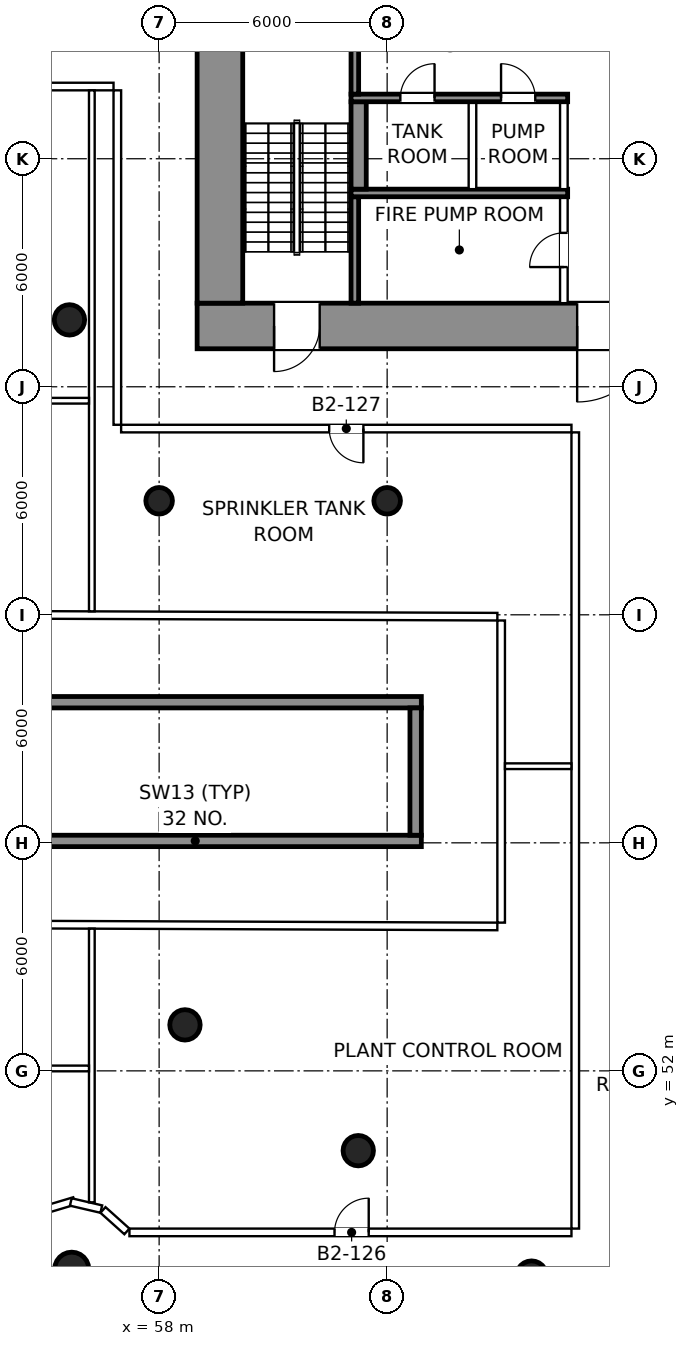
"""IFC4 building model, lengths in metres.
Left out: names, types, materials, properties, quantities, classifications, styles, units other than length and angle.
Written with IfcOpenShell. Run it as: python <this file> out.ifc"""

import sys

from ifc_helpers import new_model, si_unit, direction, frame, frame_2d, origin, origin_2d, place, context, subcontext, project, spatial, rectangle, circle, extrude, element, fill, save


model = new_model("IFC4")
c1 = context("Model", 3, precision=1e-05, world=origin(), true_north=direction((0.0, 1.0)))
c2 = subcontext(c1, "Body", "Model", "MODEL_VIEW")
j1 = project(units=[si_unit("LENGTHUNIT", "METRE"), si_unit("PLANEANGLEUNIT", "RADIAN")], contexts=[c1])
p1 = place(None, origin())
s1 = spatial("IfcSite", under=j1, at=p1, CompositionType="ELEMENT")
p2 = place(p1, origin())
s2 = spatial("IfcBuilding", under=s1, at=p2, CompositionType="ELEMENT")
p3 = place(p2, frame((0.0, 0.0, -10.0)))
s3 = spatial("IfcBuildingStorey", under=s2, at=p3, CompositionType="ELEMENT", Elevation=-10.0)
p4 = place(p3, frame((55.7, 46.78, 0.0), z_axis=(0.0, 0.0, 1.0), x_axis=(1.0, 0.0, 0.0)))
e1 = element("IfcColumn", 1, at=p4, inside=s3, PredefinedType="COLUMN", context=c2, shape_type="SweptSolid", body=[
    extrude(circle(Radius=0.45, at=origin_2d()), origin(), (0.0, 0.0, 1.0), 5.0),
])
for number, where, z_axis, x_axis in (
    (2, (58.68, 53.21, 0.0), (0.0, 0.0, 1.0), (1.0, 0.0, 0.0)),
    (3, (63.24, 49.9, 0.0), (0.0, 0.0, 1.0), (1.0, 0.0, 0.0)),
    (4, (67.8, 46.6, 0.0), (0.0, 0.0, 1.0), (1.0, 0.0, 0.0)),
    (5, (55.64, 71.76, 0.0), (0.0, 0.0, 1.0), (1.0, 0.0, 0.0)),
):
    element("IfcColumn", number, at=place(p3, frame(where, z_axis=z_axis, x_axis=x_axis)), inside=s3, PredefinedType="COLUMN", context=c2, shape_type="SweptSolid", body=[
        extrude(circle(Radius=0.4, at=origin_2d()), origin(), (0.0, 0.0, 1.0), 5.0),
    ])
for number, where, z_axis, x_axis in (
    (6, (58.0, 67.0, 0.0), (0.0, 0.0, 1.0), (1.0, 0.0, 0.0)),
    (7, (64.0, 67.0, 0.0), (0.0, 0.0, 1.0), (1.0, 0.0, 0.0)),
):
    element("IfcColumn", number, at=place(p3, frame(where, z_axis=z_axis, x_axis=x_axis)), inside=s3, PredefinedType="COLUMN", context=c2, shape_type="SweptSolid", body=[
        extrude(circle(Radius=0.35, at=origin_2d()), origin(), (0.0, 0.0, 1.0), 5.0),
    ])
p5 = place(p3, frame((59.0, 71.6, 0.0), z_axis=(0.0, 0.0, 1.0), x_axis=(1.0, 0.0, 0.0)))
e8 = element("IfcWall", 8, at=p5, inside=s3, PredefinedType="SHEAR", context=c2, shape_type="SweptSolid", body=[
    extrude(rectangle(XDim=22.0, YDim=1.2, at=frame_2d((11.0, 0.0))), origin(), (0.0, 0.0, 1.0), 5.0),
])
p6 = place(p5, frame((2.025, 0.0, 0.0)))
e9 = element("IfcOpeningElement", 9, at=p6, cuts=e8, PredefinedType="OPENING", context=c2, shape_type="SweptSolid", body=[
    extrude(rectangle(XDim=1.2, YDim=2.1, at=frame_2d((0.6, 1.05))), frame((0.0, 0.61, 0.0), z_axis=(0.0, -1.0, 0.0), x_axis=(1.0, 0.0, 0.0)), (0.0, 0.0, 1.0), 1.22),
])
p7 = place(p5, frame((18.775, 0.0, 0.0)))
e10 = element("IfcOpeningElement", 10, at=p7, cuts=e8, PredefinedType="OPENING", context=c2, shape_type="SweptSolid", body=[
    extrude(rectangle(XDim=1.2, YDim=2.1, at=frame_2d((0.6, 1.05))), frame((0.0, 0.61, 0.0), z_axis=(0.0, -1.0, 0.0), x_axis=(1.0, 0.0, 0.0)), (0.0, 0.0, 1.0), 1.22),
])
p8 = place(p5, frame((10.0, 0.0, 0.0)))
e11 = element("IfcOpeningElement", 11, at=p8, cuts=e8, PredefinedType="OPENING", context=c2, shape_type="SweptSolid", body=[
    extrude(rectangle(XDim=2.0, YDim=2.1, at=frame_2d((1.0, 1.05))), frame((0.0, 0.61, 0.0), z_axis=(0.0, -1.0, 0.0), x_axis=(1.0, 0.0, 0.0)), (0.0, 0.0, 1.0), 1.22),
])
p9 = place(p3, frame((59.6, 72.2, 0.0), z_axis=(0.0, 0.0, 1.0), x_axis=(0.0, 1.0, 0.0)))
e12 = element("IfcWall", 12, at=p9, inside=s3, PredefinedType="SHEAR", context=c2, shape_type="SweptSolid", body=[
    extrude(rectangle(XDim=8.7, YDim=1.2, at=frame_2d((4.35, 0.0))), origin(), (0.0, 0.0, 1.0), 5.0),
])
p10 = place(p3, frame((63.15, 72.2, 0.0), z_axis=(0.0, 0.0, 1.0), x_axis=(0.0, 1.0, 0.0)))
e13 = element("IfcWall", 13, at=p10, inside=s3, PredefinedType="SHEAR", context=c2, shape_type="SweptSolid", body=[
    extrude(rectangle(XDim=2.8, YDim=0.2, at=frame_2d((1.4, 0.0))), origin(), (0.0, 0.0, 1.0), 5.0),
])
p11 = place(p3, frame((68.65, 72.2, 0.0), z_axis=(0.0, 0.0, 1.0), x_axis=(0.0, 1.0, 0.0)))
e14 = element("IfcWall", 14, at=p11, inside=s3, PredefinedType="PARTITIONING", context=c2, shape_type="SweptSolid", body=[
    extrude(rectangle(XDim=2.8, YDim=0.2, at=frame_2d((1.4, 0.0))), origin(), (0.0, 0.0, 1.0), 4.65),
])
p12 = place(p11, frame((0.95, 0.0, 0.0)))
e15 = element("IfcOpeningElement", 15, at=p12, cuts=e14, PredefinedType="OPENING", context=c2, shape_type="SweptSolid", body=[
    extrude(rectangle(XDim=0.9, YDim=2.1, at=frame_2d((0.45, 1.05))), frame((0.0, 0.11, 0.0), z_axis=(0.0, -1.0, 0.0), x_axis=(1.0, 0.0, 0.0)), (0.0, 0.0, 1.0), 0.22),
])
p13 = place(p3, frame((63.05, 75.1, 0.0), z_axis=(0.0, 0.0, 1.0), x_axis=(1.0, 0.0, 0.0)))
e16 = element("IfcWall", 16, at=p13, inside=s3, PredefinedType="SHEAR", context=c2, shape_type="SweptSolid", body=[
    extrude(rectangle(XDim=5.7, YDim=0.2, at=frame_2d((2.85, 0.0))), origin(), (0.0, 0.0, 1.0), 5.0),
])
p14 = place(p3, frame((63.25, 75.2, 0.0), z_axis=(0.0, 0.0, 1.0), x_axis=(0.0, 1.0, 0.0)))
e17 = element("IfcWall", 17, at=p14, inside=s3, PredefinedType="SHEAR", context=c2, shape_type="SweptSolid", body=[
    extrude(rectangle(XDim=2.3, YDim=0.4, at=frame_2d((1.15, 0.0))), origin(), (0.0, 0.0, 1.0), 5.0),
])
for number, where, z_axis, x_axis in (
    (18, (66.245, 75.2, 0.0), (0.0, 0.0, 1.0), (0.0, 1.0, 0.0)),
    (19, (68.65, 75.2, 0.0), (0.0, 0.0, 1.0), (0.0, 1.0, 0.0)),
):
    element("IfcWall", number, at=place(p3, frame(where, z_axis=z_axis, x_axis=x_axis)), inside=s3, PredefinedType="PARTITIONING", context=c2, shape_type="SweptSolid", body=[
        extrude(rectangle(XDim=2.3, YDim=0.2, at=frame_2d((1.15, 0.0))), origin(), (0.0, 0.0, 1.0), 4.65),
    ])
p15 = place(p3, frame((63.05, 77.6, 0.0), z_axis=(0.0, 0.0, 1.0), x_axis=(1.0, 0.0, 0.0)))
e20 = element("IfcWall", 20, at=p15, inside=s3, PredefinedType="SHEAR", context=c2, shape_type="SweptSolid", body=[
    extrude(rectangle(XDim=5.7, YDim=0.2, at=frame_2d((2.85, 0.0))), origin(), (0.0, 0.0, 1.0), 5.0),
])
p16 = place(p15, frame((1.298, 0.0, 0.0)))
e21 = element("IfcOpeningElement", 21, at=p16, cuts=e20, PredefinedType="OPENING", context=c2, shape_type="SweptSolid", body=[
    extrude(rectangle(XDim=0.9, YDim=2.1, at=frame_2d((0.45, 1.05))), frame((0.0, 0.11, 0.0), z_axis=(0.0, -1.0, 0.0), x_axis=(1.0, 0.0, 0.0)), (0.0, 0.0, 1.0), 0.22),
])
p17 = place(p15, frame((3.948, 0.0, 0.0)))
e22 = element("IfcOpeningElement", 22, at=p17, cuts=e20, PredefinedType="OPENING", context=c2, shape_type="SweptSolid", body=[
    extrude(rectangle(XDim=0.9, YDim=2.1, at=frame_2d((0.45, 1.05))), frame((0.0, 0.11, 0.0), z_axis=(0.0, -1.0, 0.0), x_axis=(1.0, 0.0, 0.0)), (0.0, 0.0, 1.0), 0.22),
])
p18 = place(p3, frame((63.15, 77.7, 0.0), z_axis=(0.0, 0.0, 1.0), x_axis=(0.0, 1.0, 0.0)))
e23 = element("IfcWall", 23, at=p18, inside=s3, PredefinedType="SHEAR", context=c2, shape_type="SweptSolid", body=[
    extrude(rectangle(XDim=3.2, YDim=0.2, at=frame_2d((1.6, 0.0))), origin(), (0.0, 0.0, 1.0), 5.0),
])
for number, where, z_axis, x_axis in (
    (24, (53.0, 58.05, 0.0), (0.0, 0.0, 1.0), (1.0, 0.0, 0.0)),
    (25, (53.0, 61.7, 0.0), (0.0, 0.0, 1.0), (1.0, 0.0, 0.0)),
):
    element("IfcWall", number, at=place(p3, frame(where, z_axis=z_axis, x_axis=x_axis)), inside=s3, PredefinedType="SHEAR", context=c2, shape_type="SweptSolid", body=[
        extrude(rectangle(XDim=11.9, YDim=0.3, at=frame_2d((5.95, 0.0))), origin(), (0.0, 0.0, 1.0), 5.0),
    ])
p19 = place(p3, frame((64.75, 58.2, 0.0), z_axis=(0.0, 0.0, 1.0), x_axis=(0.0, 1.0, 0.0)))
e26 = element("IfcWall", 26, at=p19, inside=s3, PredefinedType="SHEAR", context=c2, shape_type="SweptSolid", body=[
    extrude(rectangle(XDim=3.35, YDim=0.3, at=frame_2d((1.675, 0.0))), origin(), (0.0, 0.0, 1.0), 5.0),
])
p20 = place(p3, frame((63.17, 31.88, 0.0), z_axis=(0.0, 0.0, 1.0), x_axis=(-0.809016646189, 0.587785731529, 0.0)))
e27 = element("IfcWall", 27, at=p20, inside=s3, PredefinedType="PARTITIONING", context=c2, shape_type="SweptSolid", body=[
    extrude(rectangle(XDim=26.708, YDim=0.2, at=frame_2d((13.354, 0.0))), origin(), (0.0, 0.0, 1.0), 4.65),
])
p21 = place(p20, frame((24.097, 0.0, 0.0)))
e28 = element("IfcOpeningElement", 28, at=p21, cuts=e27, PredefinedType="OPENING", context=c2, shape_type="SweptSolid", body=[
    extrude(rectangle(XDim=0.9, YDim=2.1, at=frame_2d((0.45, 1.05))), frame((0.0, 0.11, 0.0), z_axis=(0.0, -1.0, 0.0), x_axis=(1.0, 0.0, 0.0)), (0.0, 0.0, 1.0), 0.22),
])
p22 = place(p20, frame((15.904, 0.0, 0.0)))
e29 = element("IfcOpeningElement", 29, at=p22, cuts=e27, PredefinedType="OPENING", context=c2, shape_type="SweptSolid", body=[
    extrude(rectangle(XDim=0.9, YDim=2.1, at=frame_2d((0.45, 1.05))), frame((0.0, 0.11, 0.0), z_axis=(0.0, -1.0, 0.0), x_axis=(1.0, 0.0, 0.0)), (0.0, 0.0, 1.0), 0.22),
])
p23 = place(p20, frame((4.711, 0.0, 0.0)))
e30 = element("IfcOpeningElement", 30, at=p23, cuts=e27, PredefinedType="OPENING", context=c2, shape_type="SweptSolid", body=[
    extrude(rectangle(XDim=0.9, YDim=2.1, at=frame_2d((0.45, 1.05))), frame((0.0, 0.11, 0.0), z_axis=(0.0, -1.0, 0.0), x_axis=(1.0, 0.0, 0.0)), (0.0, 0.0, 1.0), 0.22),
])
p24 = place(p3, frame((67.0, 63.85, 0.0), z_axis=(0.0, 0.0, 1.0), x_axis=(0.0, -1.0, 0.0)))
e31 = element("IfcWall", 31, at=p24, inside=s3, PredefinedType="PARTITIONING", context=c2, shape_type="SweptSolid", body=[
    extrude(rectangle(XDim=7.95, YDim=0.2, at=frame_2d((3.975, 0.0))), origin(), (0.0, 0.0, 1.0), 4.65),
])
p25 = place(p3, frame((66.9, 55.8, 0.0), z_axis=(0.0, 0.0, 1.0), x_axis=(-0.999992570732, 0.003854670107, 0.0)))
e32 = element("IfcWall", 32, at=p25, inside=s3, PredefinedType="PARTITIONING", context=c2, shape_type="SweptSolid", body=[
    extrude(rectangle(XDim=25.715, YDim=0.2, at=frame_2d((12.857, 0.0))), origin(), (0.0, 0.0, 1.0), 3.85),
])
p26 = place(p25, frame((21.251, 0.0, 0.0)))
e33 = element("IfcOpeningElement", 33, at=p26, cuts=e32, PredefinedType="OPENING", context=c2, shape_type="SweptSolid", body=[
    extrude(rectangle(XDim=0.9, YDim=2.1, at=frame_2d((0.45, 1.05))), frame((0.0, 0.11, 0.0), z_axis=(0.0, -1.0, 0.0), x_axis=(1.0, 0.0, 0.0)), (0.0, 0.0, 1.0), 0.22),
])
p27 = place(p3, frame((52.885, 47.716, 0.0), z_axis=(0.0, 0.0, 1.0), x_axis=(0.958064878425, 0.286551371885, 0.0)))
e34 = element("IfcWall", 34, at=p27, inside=s3, PredefinedType="PARTITIONING", context=c2, shape_type="SweptSolid", body=[
    extrude(rectangle(XDim=3.009, YDim=0.2, at=frame_2d((1.505, 0.0))), origin(), (0.0, 0.0, 1.0), 3.95),
])
p28 = place(p3, frame((55.676, 48.55, 0.0), z_axis=(0.0, 0.0, 1.0), x_axis=(0.973904551026, -0.226957981772, 0.0)))
e35 = element("IfcWall", 35, at=p28, inside=s3, PredefinedType="PARTITIONING", context=c2, shape_type="SweptSolid", body=[
    extrude(rectangle(XDim=0.824, YDim=0.2, at=frame_2d((0.412, 0.0))), origin(), (0.0, 0.0, 1.0), 4.65),
])
p29 = place(p3, frame((56.522, 48.34, 0.0), z_axis=(0.0, 0.0, 1.0), x_axis=(0.744440847373, -0.667688418923, 0.0)))
e36 = element("IfcWall", 36, at=p29, inside=s3, PredefinedType="PARTITIONING", context=c2, shape_type="SweptSolid", body=[
    extrude(rectangle(XDim=0.846, YDim=0.2, at=frame_2d((0.423, 0.0))), origin(), (0.0, 0.0, 1.0), 4.65),
])
p30 = place(p3, frame((57.219, 47.75, 0.0), z_axis=(0.0, 0.0, 1.0), x_axis=(1.0, 0.0, 0.0)))
e37 = element("IfcWall", 37, at=p30, inside=s3, PredefinedType="PARTITIONING", context=c2, shape_type="SweptSolid", body=[
    extrude(rectangle(XDim=11.631, YDim=0.2, at=frame_2d((5.815, 0.0))), origin(), (0.0, 0.0, 1.0), 3.85),
])
p31 = place(p30, frame((5.396, 0.0, 0.0)))
e38 = element("IfcOpeningElement", 38, at=p31, cuts=e37, PredefinedType="OPENING", context=c2, shape_type="SweptSolid", body=[
    extrude(rectangle(XDim=0.9, YDim=2.1, at=frame_2d((0.45, 1.05))), frame((0.0, 0.11, 0.0), z_axis=(0.0, -1.0, 0.0), x_axis=(1.0, 0.0, 0.0)), (0.0, 0.0, 1.0), 0.22),
])
p32 = place(p3, frame((68.95, 47.85, 0.0), z_axis=(0.0, 0.0, 1.0), x_axis=(0.0, 1.0, 0.0)))
e39 = element("IfcWall", 39, at=p32, inside=s3, PredefinedType="PARTITIONING", context=c2, shape_type="SweptSolid", body=[
    extrude(rectangle(XDim=20.95, YDim=0.2, at=frame_2d((10.475, 0.0))), origin(), (0.0, 0.0, 1.0), 4.65),
])
p33 = place(p3, frame((68.85, 68.9, 0.0), z_axis=(0.0, 0.0, 1.0), x_axis=(-1.0, 0.0, 0.0)))
e40 = element("IfcWall", 40, at=p33, inside=s3, PredefinedType="PARTITIONING", context=c2, shape_type="SweptSolid", body=[
    extrude(rectangle(XDim=11.85, YDim=0.2, at=frame_2d((5.925, 0.0))), origin(), (0.0, 0.0, 1.0), 4.65),
])
p34 = place(p33, frame((5.475, 0.0, 0.0)))
e41 = element("IfcOpeningElement", 41, at=p34, cuts=e40, PredefinedType="OPENING", context=c2, shape_type="SweptSolid", body=[
    extrude(rectangle(XDim=0.9, YDim=2.1, at=frame_2d((0.45, 1.05))), frame((0.0, 0.11, 0.0), z_axis=(0.0, -1.0, 0.0), x_axis=(1.0, 0.0, 0.0)), (0.0, 0.0, 1.0), 0.22),
])
p35 = place(p3, frame((56.9, 69.0, 0.0), z_axis=(0.0, 0.0, 1.0), x_axis=(0.0, 1.0, 0.0)))
e42 = element("IfcWall", 42, at=p35, inside=s3, PredefinedType="PARTITIONING", context=c2, shape_type="SweptSolid", body=[
    extrude(rectangle(XDim=8.8, YDim=0.2, at=frame_2d((4.4, 0.0))), origin(), (0.0, 0.0, 1.0), 3.85),
])
p36 = place(p3, frame((56.8, 77.9, 0.0), z_axis=(0.0, 0.0, 1.0), x_axis=(-1.0, 0.0, 0.0)))
e43 = element("IfcWall", 43, at=p36, inside=s3, PredefinedType="PARTITIONING", context=c2, shape_type="SweptSolid", body=[
    extrude(rectangle(XDim=11.547, YDim=0.2, at=frame_2d((5.773, 0.0))), origin(), (0.0, 0.0, 1.0), 4.65),
])
p37 = place(p36, frame((4.67, 0.0, 0.0)))
e44 = element("IfcOpeningElement", 44, at=p37, cuts=e43, PredefinedType="OPENING", context=c2, shape_type="SweptSolid", body=[
    extrude(rectangle(XDim=0.9, YDim=2.1, at=frame_2d((0.45, 1.05))), frame((0.0, 0.11, 0.0), z_axis=(0.0, -1.0, 0.0), x_axis=(1.0, 0.0, 0.0)), (0.0, 0.0, 1.0), 0.22),
])
p38 = place(p3, frame((40.817, 64.05, 0.0), z_axis=(0.0, 0.0, 1.0), x_axis=(0.999992779253, -0.003800189715, 0.0)))
e45 = element("IfcWall", 45, at=p38, inside=s3, PredefinedType="PARTITIONING", context=c2, shape_type="SweptSolid", body=[
    extrude(rectangle(XDim=26.083, YDim=0.2, at=frame_2d((13.042, 0.0))), origin(), (0.0, 0.0, 1.0), 3.75),
])
p39 = place(p38, frame((3.973, 0.0, 0.0)))
e46 = element("IfcOpeningElement", 46, at=p39, cuts=e45, PredefinedType="OPENING", context=c2, shape_type="SweptSolid", body=[
    extrude(rectangle(XDim=0.9, YDim=2.1, at=frame_2d((0.45, 1.05))), frame((0.0, 0.11, 0.0), z_axis=(0.0, -1.0, 0.0), x_axis=(1.0, 0.0, 0.0)), (0.0, 0.0, 1.0), 0.22),
])
p40 = place(p3, frame((56.229, 48.542, 0.0), z_axis=(0.0, 0.0, 1.0), x_axis=(0.0, 1.0, 0.0)))
e47 = element("IfcWall", 47, at=p40, inside=s3, PredefinedType="PARTITIONING", context=c2, shape_type="SweptSolid", body=[
    extrude(rectangle(XDim=7.2, YDim=0.15, at=frame_2d((3.6, 0.0))), origin(), (0.0, 0.0, 1.0), 3.85),
])
p41 = place(p3, frame((56.229, 64.091, 0.0), z_axis=(0.0, 0.0, 1.0), x_axis=(0.0, 1.0, 0.0)))
e48 = element("IfcWall", 48, at=p41, inside=s3, PredefinedType="PARTITIONING", context=c2, shape_type="SweptSolid", body=[
    extrude(rectangle(XDim=13.709, YDim=0.15, at=frame_2d((6.854, 0.0))), origin(), (0.0, 0.0, 1.0), 3.85),
])
p42 = place(p3, frame((42.423, 52.063, 0.0), z_axis=(0.0, 0.0, 1.0), x_axis=(1.0, 0.0, 0.0)))
e49 = element("IfcWall", 49, at=p42, inside=s3, PredefinedType="PARTITIONING", context=c2, shape_type="SweptSolid", body=[
    extrude(rectangle(XDim=13.731, YDim=0.15, at=frame_2d((6.866, 0.0))), origin(), (0.0, 0.0, 1.0), 3.95),
])
p43 = place(p3, frame((67.1, 60.016, 0.0), z_axis=(0.0, 0.0, 1.0), x_axis=(1.0, 0.0, 0.0)))
e50 = element("IfcWall", 50, at=p43, inside=s3, PredefinedType="PARTITIONING", context=c2, shape_type="SweptSolid", body=[
    extrude(rectangle(XDim=1.75, YDim=0.15, at=frame_2d((0.875, 0.0))), origin(), (0.0, 0.0, 1.0), 4.65),
])
p44 = place(p3, frame((42.624, 69.633, 0.0), z_axis=(0.0, 0.0, 1.0), x_axis=(1.0, 0.0, 0.0)))
e51 = element("IfcWall", 51, at=p44, inside=s3, PredefinedType="PARTITIONING", context=c2, shape_type="SweptSolid", body=[
    extrude(rectangle(XDim=13.53, YDim=0.15, at=frame_2d((6.765, 0.0))), origin(), (0.0, 0.0, 1.0), 3.85),
])
p45 = place(p6, frame((1.2, 0.0, 0.0), z_axis=(0.0, 0.0, 1.0), x_axis=(-1.0, 0.0, 0.0)))
e52 = element("IfcDoor", 52, at=p45, inside=s3, OperationType="SINGLE_SWING_RIGHT", PredefinedType="DOOR", context=c2, shape_type="SweptSolid", body=[
    extrude(rectangle(XDim=1.2, YDim=2.1, at=frame_2d((0.6, 1.05))), frame((0.0, 0.025, 0.0), z_axis=(0.0, -1.0, 0.0), x_axis=(1.0, 0.0, 0.0)), (0.0, 0.0, 1.0), 0.05),
])
fill(e9, e52)
p46 = place(p8, frame((2.0, 0.0, 0.0), z_axis=(0.0, 0.0, 1.0), x_axis=(-1.0, 0.0, 0.0)))
e53 = element("IfcDoor", 53, at=p46, inside=s3, OperationType="DOUBLE_DOOR_SINGLE_SWING", PredefinedType="DOOR", context=c2, shape_type="SweptSolid", body=[
    extrude(rectangle(XDim=2.0, YDim=2.1, at=frame_2d((1.0, 1.05))), frame((0.0, 0.025, 0.0), z_axis=(0.0, -1.0, 0.0), x_axis=(1.0, 0.0, 0.0)), (0.0, 0.0, 1.0), 0.05),
])
fill(e11, e53)
p47 = place(p12, origin())
e54 = element("IfcDoor", 54, at=p47, inside=s3, OperationType="SINGLE_SWING_LEFT", PredefinedType="DOOR", context=c2, shape_type="SweptSolid", body=[
    extrude(rectangle(XDim=0.9, YDim=2.1, at=frame_2d((0.45, 1.05))), frame((0.0, 0.025, 0.0), z_axis=(0.0, -1.0, 0.0), x_axis=(1.0, 0.0, 0.0)), (0.0, 0.0, 1.0), 0.05),
])
fill(e15, e54)
p48 = place(p16, origin())
e55 = element("IfcDoor", 55, at=p48, inside=s3, OperationType="SINGLE_SWING_RIGHT", PredefinedType="DOOR", context=c2, shape_type="SweptSolid", body=[
    extrude(rectangle(XDim=0.9, YDim=2.1, at=frame_2d((0.45, 1.05))), frame((0.0, 0.025, 0.0), z_axis=(0.0, -1.0, 0.0), x_axis=(1.0, 0.0, 0.0)), (0.0, 0.0, 1.0), 0.05),
])
fill(e21, e55)
p49 = place(p17, origin())
e56 = element("IfcDoor", 56, at=p49, inside=s3, OperationType="SINGLE_SWING_LEFT", PredefinedType="DOOR", context=c2, shape_type="SweptSolid", body=[
    extrude(rectangle(XDim=0.9, YDim=2.1, at=frame_2d((0.45, 1.05))), frame((0.0, 0.025, 0.0), z_axis=(0.0, -1.0, 0.0), x_axis=(1.0, 0.0, 0.0)), (0.0, 0.0, 1.0), 0.05),
])
fill(e22, e56)
p50 = place(p31, origin())
e57 = element("IfcDoor", 57, at=p50, inside=s3, OperationType="SINGLE_SWING_RIGHT", PredefinedType="DOOR", context=c2, shape_type="SweptSolid", body=[
    extrude(rectangle(XDim=0.9, YDim=2.1, at=frame_2d((0.45, 1.05))), frame((0.0, 0.025, 0.0), z_axis=(0.0, -1.0, 0.0), x_axis=(1.0, 0.0, 0.0)), (0.0, 0.0, 1.0), 0.05),
])
fill(e38, e57)
p51 = place(p34, origin())
e58 = element("IfcDoor", 58, at=p51, inside=s3, OperationType="SINGLE_SWING_LEFT", PredefinedType="DOOR", context=c2, shape_type="SweptSolid", body=[
    extrude(rectangle(XDim=0.9, YDim=2.1, at=frame_2d((0.45, 1.05))), frame((0.0, 0.025, 0.0), z_axis=(0.0, -1.0, 0.0), x_axis=(1.0, 0.0, 0.0)), (0.0, 0.0, 1.0), 0.05),
])
fill(e41, e58)
save(model, sys.argv[1])
